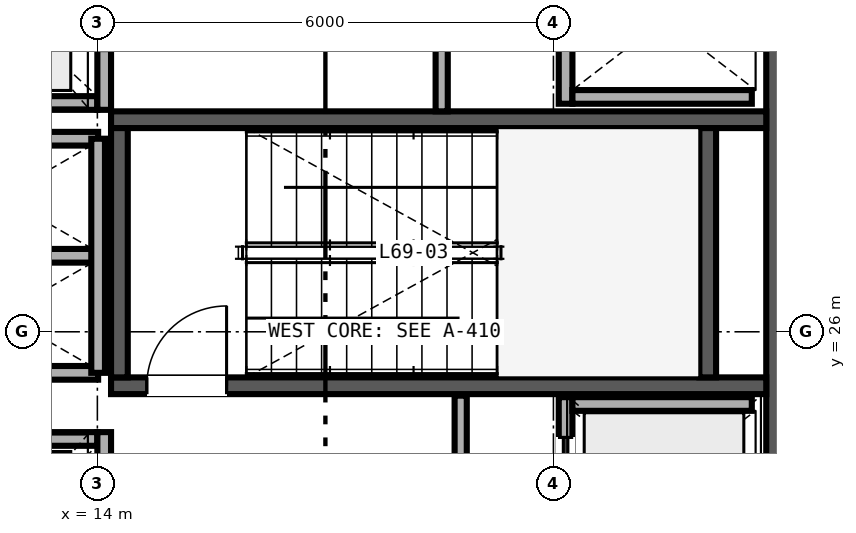
"""IFC4 building model, lengths in metres.
Left out: names, types, materials, properties, quantities, classifications, styles, units other than length and angle.
Written with IfcOpenShell. Run it as: python <this file> out.ifc"""

import sys

from ifc_helpers import new_model, si_unit, direction, frame, frame_2d, origin, place, context, subcontext, project, spatial, rectangle, extrude, source, transform, mapped, element, fill, save


model = new_model("IFC4")
c1 = context("Model", 3, precision=1e-05, world=origin(), true_north=direction((0.0, 1.0)))
c2 = subcontext(c1, "Body", "Model", "MODEL_VIEW")
j1 = project(units=[si_unit("LENGTHUNIT", "METRE"), si_unit("PLANEANGLEUNIT", "RADIAN")], contexts=[c1])
p1 = place(None, origin())
s1 = spatial("IfcSite", under=j1, at=p1, CompositionType="ELEMENT")
p2 = place(p1, origin())
s2 = spatial("IfcBuilding", under=s1, at=p2, CompositionType="ELEMENT")
p3 = place(p2, frame((0.0, 0.0, 272.4)))
s3 = spatial("IfcBuildingStorey", under=s2, at=p3, CompositionType="ELEMENT", Elevation=272.4)
p4 = place(p3, frame((23.0, 15.2, 0.0), z_axis=(0.0, 0.0, 1.0), x_axis=(0.0, 1.0, 0.0)))
e1 = element("IfcWall", 1, at=p4, inside=s3, PredefinedType="SHEAR", context=c2, shape_type="SweptSolid", body=[
    extrude(rectangle(XDim=21.6, YDim=0.4, at=frame_2d((10.8, 0.0))), origin(), (0.0, 0.0, 1.0), 3.38),
])
p5 = place(p3, frame((14.18, 25.29, 0.0), z_axis=(0.0, 0.0, 1.0), x_axis=(1.0, 0.0, 0.0)))
e2 = element("IfcWall", 2, at=p5, inside=s3, PredefinedType="SHEAR", context=c2, shape_type="SweptSolid", body=[
    extrude(rectangle(XDim=8.62, YDim=0.22, at=frame_2d((4.31, 0.0))), origin(), (0.0, 0.0, 1.0), 3.4),
])
p6 = place(p5, frame((0.47, 0.0, 0.0)))
e3 = element("IfcOpeningElement", 3, at=p6, cuts=e2, PredefinedType="OPENING", context=c2, shape_type="SweptSolid", body=[
    extrude(rectangle(XDim=1.05, YDim=2.15, at=frame_2d((0.525, 1.075))), frame((0.0, 0.12, 0.0), z_axis=(0.0, -1.0, 0.0), x_axis=(1.0, 0.0, 0.0)), (0.0, 0.0, 1.0), 0.24),
])
p7 = place(p3, frame((14.18, 28.79, 0.0), z_axis=(0.0, 0.0, 1.0), x_axis=(1.0, 0.0, 0.0)))
e4 = element("IfcWall", 4, at=p7, inside=s3, PredefinedType="SHEAR", context=c2, shape_type="SweptSolid", body=[
    extrude(rectangle(XDim=8.62, YDim=0.22, at=frame_2d((4.31, 0.0))), origin(), (0.0, 0.0, 1.0), 3.4),
])
for number, where, z_axis, x_axis in (
    (5, (14.29, 25.4, 0.0), (0.0, 0.0, 1.0), (0.0, 1.0, 0.0)),
    (6, (22.03, 25.4, 0.0), (0.0, 0.0, 1.0), (0.0, 1.0, 0.0)),
):
    element("IfcWall", number, at=place(p3, frame(where, z_axis=z_axis, x_axis=x_axis)), inside=s3, PredefinedType="SHEAR", context=c2, shape_type="SweptSolid", body=[
        extrude(rectangle(XDim=3.28, YDim=0.22, at=frame_2d((1.64, 0.0))), origin(), (0.0, 0.0, 1.0), 3.4),
    ])
p8 = place(p3, frame((20.16, 18.82, 0.0), z_axis=(0.0, 0.0, 1.0), x_axis=(0.0, 1.0, 0.0)))
e7 = element("IfcWall", 7, at=p8, inside=s3, PredefinedType="SOLIDWALL", context=c2, shape_type="SweptSolid", body=[
    extrude(rectangle(XDim=6.32, YDim=0.18, at=frame_2d((3.16, 0.0))), origin(), (0.0, 0.0, 1.0), 2.48),
])
p9 = place(p8, frame((0.555, 0.0, 0.0)))
e8 = element("IfcOpeningElement", 8, at=p9, cuts=e7, PredefinedType="OPENING", context=c2, shape_type="SweptSolid", body=[
    extrude(rectangle(XDim=1.1, YDim=2.2, at=frame_2d((0.55, 1.1))), frame((0.0, 0.1, 0.0), z_axis=(0.0, -1.0, 0.0), x_axis=(1.0, 0.0, 0.0)), (0.0, 0.0, 1.0), 0.2),
])
p10 = place(p8, frame((2.635, 0.0, 0.0)))
e9 = element("IfcOpeningElement", 9, at=p10, cuts=e7, PredefinedType="OPENING", context=c2, shape_type="SweptSolid", body=[
    extrude(rectangle(XDim=1.1, YDim=2.2, at=frame_2d((0.55, 1.1))), frame((0.0, 0.1, 0.0), z_axis=(0.0, -1.0, 0.0), x_axis=(1.0, 0.0, 0.0)), (0.0, 0.0, 1.0), 0.2),
])
p11 = place(p8, frame((4.69, 0.0, 0.0)))
e10 = element("IfcOpeningElement", 10, at=p11, cuts=e7, PredefinedType="OPENING", context=c2, shape_type="SweptSolid", body=[
    extrude(rectangle(XDim=1.1, YDim=2.2, at=frame_2d((0.55, 1.1))), frame((0.0, 0.1, 0.0), z_axis=(0.0, -1.0, 0.0), x_axis=(1.0, 0.0, 0.0)), (0.0, 0.0, 1.0), 0.2),
])
p12 = place(p3, frame((20.25, 25.05, 0.0), z_axis=(0.0, 0.0, 1.0), x_axis=(1.0, 0.0, 0.0)))
e11 = element("IfcWall", 11, at=p12, inside=s3, PredefinedType="SOLIDWALL", context=c2, shape_type="SweptSolid", body=[
    extrude(rectangle(XDim=2.36, YDim=0.18, at=frame_2d((1.18, 0.0))), origin(), (0.0, 0.0, 1.0), 3.38),
])
p13 = place(p3, frame((20.16, 29.0, 0.0), z_axis=(0.0, 0.0, 1.0), x_axis=(0.0, 1.0, 0.0)))
e12 = element("IfcWall", 12, at=p13, inside=s3, PredefinedType="SOLIDWALL", context=c2, shape_type="SweptSolid", body=[
    extrude(rectangle(XDim=4.29, YDim=0.18, at=frame_2d((2.145, 0.0))), origin(), (0.0, 0.0, 1.0), 3.38),
])
p14 = place(p3, frame((20.25, 29.09, 0.0), z_axis=(0.0, 0.0, 1.0), x_axis=(1.0, 0.0, 0.0)))
e13 = element("IfcWall", 13, at=p14, inside=s3, PredefinedType="SOLIDWALL", context=c2, shape_type="SweptSolid", body=[
    extrude(rectangle(XDim=2.36, YDim=0.18, at=frame_2d((1.18, 0.0))), origin(), (0.0, 0.0, 1.0), 3.38),
])
p15 = place(p3, frame((11.5, 24.59, 0.0), z_axis=(0.0, 0.0, 1.0), x_axis=(1.0, 0.0, 0.0)))
e14 = element("IfcWall", 14, at=p15, inside=s3, PredefinedType="SOLIDWALL", context=c2, shape_type="SweptSolid", body=[
    extrude(rectangle(XDim=2.5, YDim=0.18, at=frame_2d((1.25, 0.0))), origin(), (0.0, 0.0, 1.0), 3.38),
])
p16 = place(p3, frame((14.09, 22.02, 0.0), z_axis=(0.0, 0.0, 1.0), x_axis=(0.0, 1.0, 0.0)))
e15 = element("IfcWall", 15, at=p16, inside=s3, PredefinedType="SOLIDWALL", context=c2, shape_type="SweptSolid", body=[
    extrude(rectangle(XDim=2.66, YDim=0.18, at=frame_2d((1.33, 0.0))), origin(), (0.0, 0.0, 1.0), 3.38),
])
p17 = place(p16, frame((0.78, 0.0, 0.0)))
e16 = element("IfcOpeningElement", 16, at=p17, cuts=e15, PredefinedType="OPENING", context=c2, shape_type="SweptSolid", body=[
    extrude(rectangle(XDim=1.1, YDim=2.2, at=frame_2d((0.55, 1.1))), frame((0.0, 0.1, 0.0), z_axis=(0.0, -1.0, 0.0), x_axis=(1.0, 0.0, 0.0)), (0.0, 0.0, 1.0), 0.2),
])
p18 = place(p3, frame((11.5, 29.01, 0.0), z_axis=(0.0, 0.0, 1.0), x_axis=(1.0, 0.0, 0.0)))
e17 = element("IfcWall", 17, at=p18, inside=s3, PredefinedType="SOLIDWALL", context=c2, shape_type="SweptSolid", body=[
    extrude(rectangle(XDim=2.5, YDim=0.18, at=frame_2d((1.25, 0.0))), origin(), (0.0, 0.0, 1.0), 3.38),
])
p19 = place(p3, frame((14.09, 28.92, 0.0), z_axis=(0.0, 0.0, 1.0), x_axis=(0.0, 1.0, 0.0)))
e18 = element("IfcWall", 18, at=p19, inside=s3, PredefinedType="SOLIDWALL", context=c2, shape_type="SweptSolid", body=[
    extrude(rectangle(XDim=2.66, YDim=0.18, at=frame_2d((1.33, 0.0))), origin(), (0.0, 0.0, 1.0), 3.38),
])
p20 = place(p19, frame((0.78, 0.0, 0.0)))
e19 = element("IfcOpeningElement", 19, at=p20, cuts=e18, PredefinedType="OPENING", context=c2, shape_type="SweptSolid", body=[
    extrude(rectangle(XDim=1.1, YDim=2.2, at=frame_2d((0.55, 1.1))), frame((0.0, 0.1, 0.0), z_axis=(0.0, -1.0, 0.0), x_axis=(1.0, 0.0, 0.0)), (0.0, 0.0, 1.0), 0.2),
])
for number, where, z_axis, x_axis in (
    (20, (11.5, 25.46, 0.0), (0.0, 0.0, 1.0), (1.0, 0.0, 0.0)),
    (21, (11.5, 27.0, 0.0), (0.0, 0.0, 1.0), (1.0, 0.0, 0.0)),
    (22, (11.5, 28.54, 0.0), (0.0, 0.0, 1.0), (1.0, 0.0, 0.0)),
):
    element("IfcWall", number, at=place(p3, frame(where, z_axis=z_axis, x_axis=x_axis)), inside=s3, PredefinedType="SOLIDWALL", context=c2, shape_type="SweptSolid", body=[
        extrude(rectangle(XDim=2.51, YDim=0.18, at=frame_2d((1.255, 0.0))), origin(), (0.0, 0.0, 1.0), 3.38),
    ])
p21 = place(p3, frame((14.01, 25.46, 0.0), z_axis=(0.0, 0.0, 1.0), x_axis=(0.0, 1.0, 0.0)))
e23 = element("IfcWall", 23, at=p21, inside=s3, PredefinedType="SOLIDWALL", context=c2, shape_type="SweptSolid", body=[
    extrude(rectangle(XDim=3.08, YDim=0.18, at=frame_2d((1.54, 0.0))), origin(), (0.0, 0.0, 1.0), 3.38),
])
p22 = place(p3, frame((18.78, 21.35, 0.0), z_axis=(0.0, 0.0, 1.0), x_axis=(0.0, 1.0, 0.0)))
e24 = element("IfcWall", 24, at=p22, inside=s3, PredefinedType="PARTITIONING", context=c2, shape_type="SweptSolid", body=[
    extrude(rectangle(XDim=3.81, YDim=0.16, at=frame_2d((1.905, 0.0))), origin(), (0.0, 0.0, 1.0), 3.38),
])
p23 = place(p3, frame((18.53, 28.9, 0.0), z_axis=(0.0, 0.0, 1.0), x_axis=(0.0, 1.0, 0.0)))
e25 = element("IfcWall", 25, at=p23, inside=s3, PredefinedType="PARTITIONING", context=c2, shape_type="SweptSolid", body=[
    extrude(rectangle(XDim=3.9, YDim=0.16, at=frame_2d((1.95, 0.0))), origin(), (0.0, 0.0, 1.0), 3.38),
])
p24 = place(p23, frame((1.5, 0.0, 0.0)))
e26 = element("IfcOpeningElement", 26, at=p24, cuts=e25, PredefinedType="OPENING", context=c2, shape_type="SweptSolid", body=[
    extrude(rectangle(XDim=1.0, YDim=2.15, at=frame_2d((0.5, 1.075))), frame((0.0, 0.09, 0.0), z_axis=(0.0, -1.0, 0.0), x_axis=(1.0, 0.0, 0.0)), (0.0, 0.0, 1.0), 0.18),
])
m1 = source(origin(), c2, "Body", "SweptSolid", [
    extrude(rectangle(XDim=1.05, YDim=2.15, at=frame_2d((0.525, 1.075))), frame((0.0, 0.025, 0.0), z_axis=(0.0, -1.0, 0.0), x_axis=(1.0, 0.0, 0.0)), (0.0, 0.0, 1.0), 0.05),
])
p25 = place(p6, origin())
e27 = element("IfcDoor", 27, at=p25, inside=s3, OperationType="SINGLE_SWING_RIGHT", PredefinedType="DOOR", context=c2, shape_type="MappedRepresentation", body=[
    mapped(m1, transform((0.0, 0.0, 0.0), scale=1.0)),
])
fill(e3, e27)
m2 = source(origin(), c2, "Body", "SweptSolid", [
    extrude(rectangle(XDim=1.1, YDim=2.2, at=frame_2d((0.55, 1.1))), frame((0.0, 0.025, 0.0), z_axis=(0.0, -1.0, 0.0), x_axis=(1.0, 0.0, 0.0)), (0.0, 0.0, 1.0), 0.05),
])
p26 = place(p11, origin())
e28 = element("IfcDoor", 28, at=p26, inside=s3, OperationType="DOUBLE_DOOR_SLIDING", PredefinedType="DOOR", context=c2, shape_type="MappedRepresentation", body=[
    mapped(m2, transform((0.0, 0.0, 0.0), scale=1.0)),
])
fill(e10, e28)
save(model, sys.argv[1])
